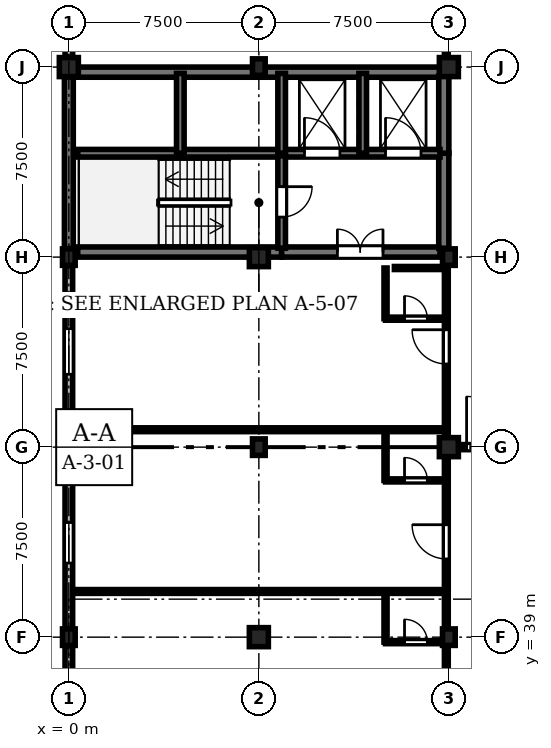
"""IFC4 building model, lengths in metres.
Left out: names, types, materials, properties, quantities, classifications, styles, units other than length and angle.
Written with IfcOpenShell. Run it as: python <this file> out.ifc"""

import sys

from ifc_helpers import new_model, si_unit, direction, frame, frame_2d, origin, origin_2d, place, context, subcontext, project, spatial, rectangle, extrude, element, fill, save


model = new_model("IFC4")
c1 = context("Model", 3, precision=1e-05, world=origin(), true_north=direction((0.0, 1.0)))
c2 = subcontext(c1, "Body", "Model", "MODEL_VIEW")
j1 = project(units=[si_unit("LENGTHUNIT", "METRE"), si_unit("PLANEANGLEUNIT", "RADIAN")], contexts=[c1])
p1 = place(None, origin())
s1 = spatial("IfcSite", under=j1, at=p1, CompositionType="ELEMENT")
p2 = place(p1, origin())
s2 = spatial("IfcBuilding", under=s1, at=p2, CompositionType="ELEMENT")
p3 = place(p2, frame((0.0, 0.0, 14.1)))
s3 = spatial("IfcBuildingStorey", under=s2, at=p3, CompositionType="ELEMENT", Elevation=14.1)
p4 = place(p3, frame((0.0, 39.0, 0.0), z_axis=(0.0, 0.0, 1.0), x_axis=(1.0, 0.0, 0.0)))
e1 = element("IfcColumn", 1, at=p4, inside=s3, PredefinedType="COLUMN", context=c2, shape_type="SweptSolid", body=[
    extrude(rectangle(XDim=0.5, YDim=0.65, at=origin_2d()), origin(), (0.0, 0.0, 1.0), 3.75),
])
p5 = place(p3, frame((0.0, 46.5, 0.0), z_axis=(0.0, 0.0, 1.0), x_axis=(1.0, 0.0, 0.0)))
e2 = element("IfcColumn", 2, at=p5, inside=s3, PredefinedType="COLUMN", context=c2, shape_type="SweptSolid", body=[
    extrude(rectangle(XDim=0.75, YDim=0.75, at=origin_2d()), origin(), (0.0, 0.0, 1.0), 3.75),
])
p6 = place(p3, frame((0.0, 54.0, 0.0), z_axis=(0.0, 0.0, 1.0), x_axis=(1.0, 0.0, 0.0)))
e3 = element("IfcColumn", 3, at=p6, inside=s3, PredefinedType="COLUMN", context=c2, shape_type="SweptSolid", body=[
    extrude(rectangle(XDim=0.5, YDim=0.65, at=origin_2d()), origin(), (0.0, 0.0, 1.0), 3.75),
])
for number, where, z_axis, x_axis in (
    (4, (0.0, 61.5, 0.0), (0.0, 0.0, 1.0), (1.0, 0.0, 0.0)),
    (5, (7.5, 39.0, 0.0), (0.0, 0.0, 1.0), (1.0, 0.0, 0.0)),
):
    element("IfcColumn", number, at=place(p3, frame(where, z_axis=z_axis, x_axis=x_axis)), inside=s3, PredefinedType="COLUMN", context=c2, shape_type="SweptSolid", body=[
        extrude(rectangle(XDim=0.75, YDim=0.75, at=origin_2d()), origin(), (0.0, 0.0, 1.0), 3.75),
    ])
p7 = place(p3, frame((7.5, 46.5, 0.0), z_axis=(0.0, 0.0, 1.0), x_axis=(1.0, 0.0, 0.0)))
e6 = element("IfcColumn", 6, at=p7, inside=s3, PredefinedType="COLUMN", context=c2, shape_type="SweptSolid", body=[
    extrude(rectangle(XDim=0.5, YDim=0.65, at=origin_2d()), origin(), (0.0, 0.0, 1.0), 3.75),
])
p8 = place(p3, frame((7.5, 54.0, 0.0), z_axis=(0.0, 0.0, 1.0), x_axis=(1.0, 0.0, 0.0)))
e7 = element("IfcColumn", 7, at=p8, inside=s3, PredefinedType="COLUMN", context=c2, shape_type="SweptSolid", body=[
    extrude(rectangle(XDim=0.75, YDim=0.75, at=origin_2d()), origin(), (0.0, 0.0, 1.0), 3.75),
])
for number, where, z_axis, x_axis in (
    (8, (7.5, 61.5, 0.0), (0.0, 0.0, 1.0), (1.0, 0.0, 0.0)),
    (9, (15.0, 39.0, 0.0), (0.0, 0.0, 1.0), (1.0, 0.0, 0.0)),
):
    element("IfcColumn", number, at=place(p3, frame(where, z_axis=z_axis, x_axis=x_axis)), inside=s3, PredefinedType="COLUMN", context=c2, shape_type="SweptSolid", body=[
        extrude(rectangle(XDim=0.5, YDim=0.65, at=origin_2d()), origin(), (0.0, 0.0, 1.0), 3.75),
    ])
p9 = place(p3, frame((15.0, 46.5, 0.0), z_axis=(0.0, 0.0, 1.0), x_axis=(1.0, 0.0, 0.0)))
e10 = element("IfcColumn", 10, at=p9, inside=s3, PredefinedType="COLUMN", context=c2, shape_type="SweptSolid", body=[
    extrude(rectangle(XDim=0.75, YDim=0.75, at=origin_2d()), origin(), (0.0, 0.0, 1.0), 3.75),
])
p10 = place(p3, frame((15.0, 54.0, 0.0), z_axis=(0.0, 0.0, 1.0), x_axis=(1.0, 0.0, 0.0)))
e11 = element("IfcColumn", 11, at=p10, inside=s3, PredefinedType="COLUMN", context=c2, shape_type="SweptSolid", body=[
    extrude(rectangle(XDim=0.5, YDim=0.65, at=origin_2d()), origin(), (0.0, 0.0, 1.0), 3.75),
])
p11 = place(p3, frame((15.0, 61.5, 0.0), z_axis=(0.0, 0.0, 1.0), x_axis=(1.0, 0.0, 0.0)))
e12 = element("IfcColumn", 12, at=p11, inside=s3, PredefinedType="COLUMN", context=c2, shape_type="SweptSolid", body=[
    extrude(rectangle(XDim=0.75, YDim=0.75, at=origin_2d()), origin(), (0.0, 0.0, 1.0), 3.75),
])
p12 = place(p3, frame((0.0, 31.885, 0.0), z_axis=(0.0, 0.0, 1.0), x_axis=(0.0, 1.0, 0.0)))
e13 = element("IfcWall", 13, at=p12, inside=s3, PredefinedType="STANDARD", context=c2, shape_type="SweptSolid", body=[
    extrude(rectangle(XDim=6.78, YDim=0.3, at=frame_2d((3.39, 0.0))), origin(), (0.0, 0.0, 1.0), 2.87),
])
p13 = place(p12, frame((2.69, 0.0, 0.9)))
e14 = element("IfcOpeningElement", 14, at=p13, cuts=e13, PredefinedType="OPENING", context=c2, shape_type="SweptSolid", body=[
    extrude(rectangle(XDim=1.4, YDim=1.69, at=frame_2d((0.7, 0.845))), frame((0.0, 0.16, 0.0), z_axis=(0.0, -1.0, 0.0), x_axis=(1.0, 0.0, 0.0)), (0.0, 0.0, 1.0), 0.32),
])
p14 = place(p3, frame((0.0, 39.335, 0.0), z_axis=(0.0, 0.0, 1.0), x_axis=(0.0, 1.0, 0.0)))
e15 = element("IfcWall", 15, at=p14, inside=s3, PredefinedType="STANDARD", context=c2, shape_type="SweptSolid", body=[
    extrude(rectangle(XDim=6.78, YDim=0.3, at=frame_2d((3.39, 0.0))), origin(), (0.0, 0.0, 1.0), 2.87),
])
p15 = place(p14, frame((2.59, 0.0, 0.9)))
e16 = element("IfcOpeningElement", 16, at=p15, cuts=e15, PredefinedType="OPENING", context=c2, shape_type="SweptSolid", body=[
    extrude(rectangle(XDim=1.6, YDim=1.69, at=frame_2d((0.8, 0.845))), frame((0.0, 0.16, 0.0), z_axis=(0.0, -1.0, 0.0), x_axis=(1.0, 0.0, 0.0)), (0.0, 0.0, 1.0), 0.32),
])
p16 = place(p3, frame((0.0, 46.885, 0.0), z_axis=(0.0, 0.0, 1.0), x_axis=(0.0, 1.0, 0.0)))
e17 = element("IfcWall", 17, at=p16, inside=s3, PredefinedType="STANDARD", context=c2, shape_type="SweptSolid", body=[
    extrude(rectangle(XDim=6.78, YDim=0.3, at=frame_2d((3.39, 0.0))), origin(), (0.0, 0.0, 1.0), 2.87),
])
p17 = place(p16, frame((2.49, 0.0, 0.9)))
e18 = element("IfcOpeningElement", 18, at=p17, cuts=e17, PredefinedType="OPENING", context=c2, shape_type="SweptSolid", body=[
    extrude(rectangle(XDim=1.8, YDim=1.69, at=frame_2d((0.9, 0.845))), frame((0.0, 0.16, 0.0), z_axis=(0.0, -1.0, 0.0), x_axis=(1.0, 0.0, 0.0)), (0.0, 0.0, 1.0), 0.32),
])
p18 = place(p3, frame((0.0, 54.335, 0.0), z_axis=(0.0, 0.0, 1.0), x_axis=(0.0, 1.0, 0.0)))
e19 = element("IfcWall", 19, at=p18, inside=s3, PredefinedType="SHEAR", context=c2, shape_type="SweptSolid", body=[
    extrude(rectangle(XDim=6.78, YDim=0.35, at=frame_2d((3.39, 0.0))), origin(), (0.0, 0.0, 1.0), 3.47),
])
p19 = place(p3, frame((0.0, 61.885, 0.0), z_axis=(0.0, 0.0, 1.0), x_axis=(0.0, 1.0, 0.0)))
e20 = element("IfcWall", 20, at=p19, inside=s3, PredefinedType="STANDARD", context=c2, shape_type="SweptSolid", body=[
    extrude(rectangle(XDim=6.78, YDim=0.3, at=frame_2d((3.39, 0.0))), origin(), (0.0, 0.0, 1.0), 2.87),
])
p20 = place(p19, frame((2.64, 0.0, 0.9)))
e21 = element("IfcOpeningElement", 21, at=p20, cuts=e20, PredefinedType="OPENING", context=c2, shape_type="SweptSolid", body=[
    extrude(rectangle(XDim=1.5, YDim=1.69, at=frame_2d((0.75, 0.845))), frame((0.0, 0.16, 0.0), z_axis=(0.0, -1.0, 0.0), x_axis=(1.0, 0.0, 0.0)), (0.0, 0.0, 1.0), 0.32),
])
p21 = place(p3, frame((0.35, 54.2, 0.0), z_axis=(0.0, 0.0, 1.0), x_axis=(1.0, 0.0, 0.0)))
e22 = element("IfcWall", 22, at=p21, inside=s3, PredefinedType="SHEAR", context=c2, shape_type="SweptSolid", body=[
    extrude(rectangle(XDim=8.05, YDim=0.4, at=frame_2d((4.025, 0.0))), origin(), (0.0, 0.0, 1.0), 3.47),
])
p22 = place(p3, frame((8.4, 54.2, 0.0), z_axis=(0.0, 0.0, 1.0), x_axis=(1.0, 0.0, 0.0)))
e23 = element("IfcWall", 23, at=p22, inside=s3, PredefinedType="SHEAR", context=c2, shape_type="SweptSolid", body=[
    extrude(rectangle(XDim=6.25, YDim=0.4, at=frame_2d((3.125, 0.0))), origin(), (0.0, 0.0, 1.0), 3.47),
])
p23 = place(p22, frame((2.2, 0.0, 0.0)))
e24 = element("IfcOpeningElement", 24, at=p23, cuts=e23, PredefinedType="OPENING", context=c2, shape_type="SweptSolid", body=[
    extrude(rectangle(XDim=1.8, YDim=2.25, at=frame_2d((0.9, 1.125))), frame((0.0, 0.21, 0.0), z_axis=(0.0, -1.0, 0.0), x_axis=(1.0, 0.0, 0.0)), (0.0, 0.0, 1.0), 0.42),
])
p24 = place(p3, frame((0.35, 61.3, 0.0), z_axis=(0.0, 0.0, 1.0), x_axis=(1.0, 0.0, 0.0)))
e25 = element("IfcWall", 25, at=p24, inside=s3, PredefinedType="SHEAR", context=c2, shape_type="SweptSolid", body=[
    extrude(rectangle(XDim=14.3, YDim=0.4, at=frame_2d((7.15, 0.0))), origin(), (0.0, 0.0, 1.0), 3.47),
])
p25 = place(p3, frame((14.8, 54.35, 0.0), z_axis=(0.0, 0.0, 1.0), x_axis=(0.0, 1.0, 0.0)))
e26 = element("IfcWall", 26, at=p25, inside=s3, PredefinedType="SHEAR", context=c2, shape_type="SweptSolid", body=[
    extrude(rectangle(XDim=3.75, YDim=0.4, at=frame_2d((1.875, 0.0))), origin(), (0.0, 0.0, 1.0), 3.47),
])
p26 = place(p3, frame((14.8, 58.1, 0.0), z_axis=(0.0, 0.0, 1.0), x_axis=(0.0, 1.0, 0.0)))
e27 = element("IfcWall", 27, at=p26, inside=s3, PredefinedType="SHEAR", context=c2, shape_type="SweptSolid", body=[
    extrude(rectangle(XDim=3.05, YDim=0.4, at=frame_2d((1.525, 0.0))), origin(), (0.0, 0.0, 1.0), 3.47),
])
p27 = place(p3, frame((0.35, 58.1, 0.0), z_axis=(0.0, 0.0, 1.0), x_axis=(1.0, 0.0, 0.0)))
e28 = element("IfcWall", 28, at=p27, inside=s3, PredefinedType="SHEAR", context=c2, shape_type="SweptSolid", body=[
    extrude(rectangle(XDim=8.05, YDim=0.3, at=frame_2d((4.025, 0.0))), origin(), (0.0, 0.0, 1.0), 3.47),
])
p28 = place(p3, frame((8.4, 58.1, 0.0), z_axis=(0.0, 0.0, 1.0), x_axis=(1.0, 0.0, 0.0)))
e29 = element("IfcWall", 29, at=p28, inside=s3, PredefinedType="SHEAR", context=c2, shape_type="SweptSolid", body=[
    extrude(rectangle(XDim=6.25, YDim=0.3, at=frame_2d((3.125, 0.0))), origin(), (0.0, 0.0, 1.0), 3.47),
])
p29 = place(p28, frame((0.9, 0.0, 0.0)))
e30 = element("IfcOpeningElement", 30, at=p29, cuts=e29, PredefinedType="OPENING", context=c2, shape_type="SweptSolid", body=[
    extrude(rectangle(XDim=1.4, YDim=2.25, at=frame_2d((0.7, 1.125))), frame((0.0, 0.16, 0.0), z_axis=(0.0, -1.0, 0.0), x_axis=(1.0, 0.0, 0.0)), (0.0, 0.0, 1.0), 0.32),
])
p30 = place(p28, frame((4.1, 0.0, 0.0)))
e31 = element("IfcOpeningElement", 31, at=p30, cuts=e29, PredefinedType="OPENING", context=c2, shape_type="SweptSolid", body=[
    extrude(rectangle(XDim=1.4, YDim=2.25, at=frame_2d((0.7, 1.125))), frame((0.0, 0.16, 0.0), z_axis=(0.0, -1.0, 0.0), x_axis=(1.0, 0.0, 0.0)), (0.0, 0.0, 1.0), 0.32),
])
p31 = place(p3, frame((8.4, 58.0, 0.0), z_axis=(0.0, 0.0, 1.0), x_axis=(0.0, -1.0, 0.0)))
e32 = element("IfcWall", 32, at=p31, inside=s3, PredefinedType="SHEAR", context=c2, shape_type="SweptSolid", body=[
    extrude(rectangle(XDim=3.65, YDim=0.3, at=frame_2d((1.825, 0.0))), origin(), (0.0, 0.0, 1.0), 3.47),
])
p32 = place(p31, frame((1.22, 0.0, 0.0)))
e33 = element("IfcOpeningElement", 33, at=p32, cuts=e32, PredefinedType="OPENING", context=c2, shape_type="SweptSolid", body=[
    extrude(rectangle(XDim=1.2, YDim=2.25, at=frame_2d((0.6, 1.125))), frame((0.0, 0.16, 0.0), z_axis=(0.0, -1.0, 0.0), x_axis=(1.0, 0.0, 0.0)), (0.0, 0.0, 1.0), 0.32),
])
for number, where, z_axis, x_axis in (
    (34, (4.4, 58.1, 0.0), (0.0, 0.0, 1.0), (0.0, 1.0, 0.0)),
    (35, (8.4, 58.1, 0.0), (0.0, 0.0, 1.0), (0.0, 1.0, 0.0)),
    (36, (11.6, 58.1, 0.0), (0.0, 0.0, 1.0), (0.0, 1.0, 0.0)),
):
    element("IfcWall", number, at=place(p3, frame(where, z_axis=z_axis, x_axis=x_axis)), inside=s3, PredefinedType="SHEAR", context=c2, shape_type="SweptSolid", body=[
        extrude(rectangle(XDim=3.15, YDim=0.3, at=frame_2d((1.575, 0.0))), origin(), (0.0, 0.0, 1.0), 3.47),
    ])
p33 = place(p3, frame((14.9, 34.58, 0.0), z_axis=(0.0, 0.0, 1.0), x_axis=(0.0, 1.0, 0.0)))
e37 = element("IfcWall", 37, at=p33, inside=s3, PredefinedType="PARTITIONING", context=c2, shape_type="SweptSolid", body=[
    extrude(rectangle(XDim=6.223, YDim=0.15, at=frame_2d((3.112, 0.0))), origin(), (0.0, 0.0, 1.0), 2.905),
])
p34 = place(p33, frame((0.25, 0.0, 0.0)))
e38 = element("IfcOpeningElement", 38, at=p34, cuts=e37, PredefinedType="OPENING", context=c2, shape_type="SweptSolid", body=[
    extrude(rectangle(XDim=1.35, YDim=2.25, at=frame_2d((0.675, 1.125))), frame((0.0, 0.085, 0.0), z_axis=(0.0, -1.0, 0.0), x_axis=(1.0, 0.0, 0.0)), (0.0, 0.0, 1.0), 0.17),
])
p35 = place(p3, frame((12.5, 38.803, 0.0), z_axis=(0.0, 0.0, 1.0), x_axis=(1.0, 0.0, 0.0)))
e39 = element("IfcWall", 39, at=p35, inside=s3, PredefinedType="PARTITIONING", context=c2, shape_type="SweptSolid", body=[
    extrude(rectangle(XDim=2.4, YDim=0.12, at=frame_2d((1.2, 0.0))), origin(), (0.0, 0.0, 1.0), 2.855),
])
p36 = place(p35, frame((0.75, 0.0, 0.0)))
e40 = element("IfcOpeningElement", 40, at=p36, cuts=e39, PredefinedType="OPENING", context=c2, shape_type="SweptSolid", body=[
    extrude(rectangle(XDim=0.9, YDim=2.1, at=frame_2d((0.45, 1.05))), frame((0.0, 0.07, 0.0), z_axis=(0.0, -1.0, 0.0), x_axis=(1.0, 0.0, 0.0)), (0.0, 0.0, 1.0), 0.14),
])
p37 = place(p3, frame((12.5, 38.803, 0.0), z_axis=(0.0, 0.0, 1.0), x_axis=(0.0, 1.0, 0.0)))
e41 = element("IfcWall", 41, at=p37, inside=s3, PredefinedType="PARTITIONING", context=c2, shape_type="SweptSolid", body=[
    extrude(rectangle(XDim=2.0, YDim=0.12, at=frame_2d((1.0, 0.0))), origin(), (0.0, 0.0, 1.0), 3.455),
])
p38 = place(p3, frame((14.9, 40.963, 0.0), z_axis=(0.0, 0.0, 1.0), x_axis=(0.0, 1.0, 0.0)))
e42 = element("IfcWall", 42, at=p38, inside=s3, PredefinedType="PARTITIONING", context=c2, shape_type="SweptSolid", body=[
    extrude(rectangle(XDim=6.223, YDim=0.15, at=frame_2d((3.112, 0.0))), origin(), (0.0, 0.0, 1.0), 2.905),
])
p39 = place(p38, frame((1.125, 0.0, 0.0)))
e43 = element("IfcOpeningElement", 43, at=p39, cuts=e42, PredefinedType="OPENING", context=c2, shape_type="SweptSolid", body=[
    extrude(rectangle(XDim=1.35, YDim=2.25, at=frame_2d((0.675, 1.125))), frame((0.0, 0.085, 0.0), z_axis=(0.0, -1.0, 0.0), x_axis=(1.0, 0.0, 0.0)), (0.0, 0.0, 1.0), 0.17),
])
p40 = place(p3, frame((12.5, 45.187, 0.0), z_axis=(0.0, 0.0, 1.0), x_axis=(1.0, 0.0, 0.0)))
e44 = element("IfcWall", 44, at=p40, inside=s3, PredefinedType="PARTITIONING", context=c2, shape_type="SweptSolid", body=[
    extrude(rectangle(XDim=2.4, YDim=0.12, at=frame_2d((1.2, 0.0))), origin(), (0.0, 0.0, 1.0), 3.455),
])
p41 = place(p40, frame((0.75, 0.0, 0.0)))
e45 = element("IfcOpeningElement", 45, at=p41, cuts=e44, PredefinedType="OPENING", context=c2, shape_type="SweptSolid", body=[
    extrude(rectangle(XDim=0.9, YDim=2.1, at=frame_2d((0.45, 1.05))), frame((0.0, 0.07, 0.0), z_axis=(0.0, -1.0, 0.0), x_axis=(1.0, 0.0, 0.0)), (0.0, 0.0, 1.0), 0.14),
])
p42 = place(p3, frame((12.5, 45.187, 0.0), z_axis=(0.0, 0.0, 1.0), x_axis=(0.0, 1.0, 0.0)))
e46 = element("IfcWall", 46, at=p42, inside=s3, PredefinedType="PARTITIONING", context=c2, shape_type="SweptSolid", body=[
    extrude(rectangle(XDim=2.0, YDim=0.12, at=frame_2d((1.0, 0.0))), origin(), (0.0, 0.0, 1.0), 3.455),
])
p43 = place(p3, frame((14.9, 47.347, 0.0), z_axis=(0.0, 0.0, 1.0), x_axis=(0.0, 1.0, 0.0)))
e47 = element("IfcWall", 47, at=p43, inside=s3, PredefinedType="PARTITIONING", context=c2, shape_type="SweptSolid", body=[
    extrude(rectangle(XDim=6.223, YDim=0.15, at=frame_2d((3.112, 0.0))), origin(), (0.0, 0.0, 1.0), 2.905),
])
p44 = place(p43, frame((2.437, 0.0, 0.0)))
e48 = element("IfcOpeningElement", 48, at=p44, cuts=e47, PredefinedType="OPENING", context=c2, shape_type="SweptSolid", body=[
    extrude(rectangle(XDim=1.35, YDim=2.25, at=frame_2d((0.675, 1.125))), frame((0.0, 0.085, 0.0), z_axis=(0.0, -1.0, 0.0), x_axis=(1.0, 0.0, 0.0)), (0.0, 0.0, 1.0), 0.17),
])
p45 = place(p3, frame((12.5, 51.57, 0.0), z_axis=(0.0, 0.0, 1.0), x_axis=(1.0, 0.0, 0.0)))
e49 = element("IfcWall", 49, at=p45, inside=s3, PredefinedType="PARTITIONING", context=c2, shape_type="SweptSolid", body=[
    extrude(rectangle(XDim=2.4, YDim=0.12, at=frame_2d((1.2, 0.0))), origin(), (0.0, 0.0, 1.0), 3.455),
])
p46 = place(p45, frame((0.75, 0.0, 0.0)))
e50 = element("IfcOpeningElement", 50, at=p46, cuts=e49, PredefinedType="OPENING", context=c2, shape_type="SweptSolid", body=[
    extrude(rectangle(XDim=0.9, YDim=2.1, at=frame_2d((0.45, 1.05))), frame((0.0, 0.07, 0.0), z_axis=(0.0, -1.0, 0.0), x_axis=(1.0, 0.0, 0.0)), (0.0, 0.0, 1.0), 0.14),
])
p47 = place(p3, frame((12.5, 51.57, 0.0), z_axis=(0.0, 0.0, 1.0), x_axis=(0.0, 1.0, 0.0)))
e51 = element("IfcWall", 51, at=p47, inside=s3, PredefinedType="PARTITIONING", context=c2, shape_type="SweptSolid", body=[
    extrude(rectangle(XDim=2.0, YDim=0.12, at=frame_2d((1.0, 0.0))), origin(), (0.0, 0.0, 1.0), 3.455),
])
p48 = place(p3, frame((14.9, 61.93, 0.0), z_axis=(0.0, 0.0, 1.0), x_axis=(0.0, 1.0, 0.0)))
e52 = element("IfcWall", 52, at=p48, inside=s3, PredefinedType="PARTITIONING", context=c2, shape_type="SweptSolid", body=[
    extrude(rectangle(XDim=7.54, YDim=0.15, at=frame_2d((3.77, 0.0))), origin(), (0.0, 0.0, 1.0), 2.905),
])
p49 = place(p48, frame((2.526, 0.0, 0.0)))
e53 = element("IfcOpeningElement", 53, at=p49, cuts=e52, PredefinedType="OPENING", context=c2, shape_type="SweptSolid", body=[
    extrude(rectangle(XDim=1.35, YDim=2.25, at=frame_2d((0.675, 1.125))), frame((0.0, 0.085, 0.0), z_axis=(0.0, -1.0, 0.0), x_axis=(1.0, 0.0, 0.0)), (0.0, 0.0, 1.0), 0.17),
])
for number, where, z_axis, x_axis in (
    (54, (0.35, 40.803, 0.0), (0.0, 0.0, 1.0), (1.0, 0.0, 0.0)),
    (55, (0.35, 47.187, 0.0), (0.0, 0.0, 1.0), (1.0, 0.0, 0.0)),
):
    element("IfcWall", number, at=place(p3, frame(where, z_axis=z_axis, x_axis=x_axis)), inside=s3, PredefinedType="PARTITIONING", context=c2, shape_type="SweptSolid", body=[
        extrude(rectangle(XDim=14.55, YDim=0.15, at=frame_2d((7.275, 0.0))), origin(), (0.0, 0.0, 1.0), 3.455),
    ])
p50 = place(p3, frame((12.85, 53.57, 0.0), z_axis=(0.0, 0.0, 1.0), x_axis=(1.0, 0.0, 0.0)))
e56 = element("IfcWall", 56, at=p50, inside=s3, PredefinedType="PARTITIONING", context=c2, shape_type="SweptSolid", body=[
    extrude(rectangle(XDim=2.05, YDim=0.12, at=frame_2d((1.025, 0.0))), origin(), (0.0, 0.0, 1.0), 3.455),
])
p51 = place(p3, frame((15.2, 46.5, 0.0), z_axis=(0.0, 0.0, 1.0), x_axis=(1.0, 0.0, 0.0)))
e57 = element("IfcWall", 57, at=p51, inside=s3, PredefinedType="STANDARD", context=c2, shape_type="SweptSolid", body=[
    extrude(rectangle(XDim=3.0, YDim=0.2, at=frame_2d((1.5, 0.0))), origin(), (0.0, 0.0, 1.0), 2.855),
])
p52 = place(p51, frame((0.5, 0.0, 0.0)))
e58 = element("IfcOpeningElement", 58, at=p52, cuts=e57, PredefinedType="OPENING", context=c2, shape_type="SweptSolid", body=[
    extrude(rectangle(XDim=2.0, YDim=2.3, at=frame_2d((1.0, 1.15))), frame((0.0, 0.11, 0.0), z_axis=(0.0, -1.0, 0.0), x_axis=(1.0, 0.0, 0.0)), (0.0, 0.0, 1.0), 0.22),
])
p53 = place(p15, origin())
e59 = element("IfcWindow", 59, at=p53, inside=s3, PartitioningType="SINGLE_PANEL", PredefinedType="WINDOW", context=c2, shape_type="SweptSolid", body=[
    extrude(rectangle(XDim=1.6, YDim=1.69, at=frame_2d((0.8, 0.845))), frame((0.0, 0.03, 0.0), z_axis=(0.0, -1.0, 0.0), x_axis=(1.0, 0.0, 0.0)), (0.0, 0.0, 1.0), 0.06),
])
fill(e16, e59)
p54 = place(p17, origin())
e60 = element("IfcWindow", 60, at=p54, inside=s3, PartitioningType="SINGLE_PANEL", PredefinedType="WINDOW", context=c2, shape_type="SweptSolid", body=[
    extrude(rectangle(XDim=1.8, YDim=1.69, at=frame_2d((0.9, 0.845))), frame((0.0, 0.03, 0.0), z_axis=(0.0, -1.0, 0.0), x_axis=(1.0, 0.0, 0.0)), (0.0, 0.0, 1.0), 0.06),
])
fill(e18, e60)
p55 = place(p23, origin())
e61 = element("IfcDoor", 61, at=p55, inside=s3, OperationType="DOUBLE_DOOR_SINGLE_SWING", PredefinedType="DOOR", context=c2, shape_type="SweptSolid", body=[
    extrude(rectangle(XDim=1.8, YDim=2.25, at=frame_2d((0.9, 1.125))), frame((0.0, 0.025, 0.0), z_axis=(0.0, -1.0, 0.0), x_axis=(1.0, 0.0, 0.0)), (0.0, 0.0, 1.0), 0.05),
])
fill(e24, e61)
p56 = place(p29, origin())
e62 = element("IfcDoor", 62, at=p56, inside=s3, OperationType="DOUBLE_DOOR_SLIDING", PredefinedType="DOOR", context=c2, shape_type="SweptSolid", body=[
    extrude(rectangle(XDim=1.4, YDim=2.25, at=frame_2d((0.7, 1.125))), frame((0.0, 0.025, 0.0), z_axis=(0.0, -1.0, 0.0), x_axis=(1.0, 0.0, 0.0)), (0.0, 0.0, 1.0), 0.05),
])
fill(e30, e62)
p57 = place(p30, origin())
e63 = element("IfcDoor", 63, at=p57, inside=s3, OperationType="DOUBLE_DOOR_SLIDING", PredefinedType="DOOR", context=c2, shape_type="SweptSolid", body=[
    extrude(rectangle(XDim=1.4, YDim=2.25, at=frame_2d((0.7, 1.125))), frame((0.0, 0.025, 0.0), z_axis=(0.0, -1.0, 0.0), x_axis=(1.0, 0.0, 0.0)), (0.0, 0.0, 1.0), 0.05),
])
fill(e31, e63)
p58 = place(p32, origin())
e64 = element("IfcDoor", 64, at=p58, inside=s3, OperationType="SINGLE_SWING_LEFT", PredefinedType="DOOR", context=c2, shape_type="SweptSolid", body=[
    extrude(rectangle(XDim=1.2, YDim=2.25, at=frame_2d((0.6, 1.125))), frame((0.0, 0.025, 0.0), z_axis=(0.0, -1.0, 0.0), x_axis=(1.0, 0.0, 0.0)), (0.0, 0.0, 1.0), 0.05),
])
fill(e33, e64)
p59 = place(p36, origin())
e65 = element("IfcDoor", 65, at=p59, inside=s3, OperationType="SINGLE_SWING_LEFT", PredefinedType="DOOR", context=c2, shape_type="SweptSolid", body=[
    extrude(rectangle(XDim=0.9, YDim=2.1, at=frame_2d((0.45, 1.05))), frame((0.0, 0.025, 0.0), z_axis=(0.0, -1.0, 0.0), x_axis=(1.0, 0.0, 0.0)), (0.0, 0.0, 1.0), 0.05),
])
fill(e40, e65)
p60 = place(p39, origin())
e66 = element("IfcDoor", 66, at=p60, inside=s3, OperationType="SINGLE_SWING_RIGHT", PredefinedType="DOOR", context=c2, shape_type="SweptSolid", body=[
    extrude(rectangle(XDim=1.35, YDim=2.25, at=frame_2d((0.675, 1.125))), frame((0.0, 0.025, 0.0), z_axis=(0.0, -1.0, 0.0), x_axis=(1.0, 0.0, 0.0)), (0.0, 0.0, 1.0), 0.05),
])
fill(e43, e66)
p61 = place(p41, origin())
e67 = element("IfcDoor", 67, at=p61, inside=s3, OperationType="SINGLE_SWING_LEFT", PredefinedType="DOOR", context=c2, shape_type="SweptSolid", body=[
    extrude(rectangle(XDim=0.9, YDim=2.1, at=frame_2d((0.45, 1.05))), frame((0.0, 0.025, 0.0), z_axis=(0.0, -1.0, 0.0), x_axis=(1.0, 0.0, 0.0)), (0.0, 0.0, 1.0), 0.05),
])
fill(e45, e67)
p62 = place(p44, origin())
e68 = element("IfcDoor", 68, at=p62, inside=s3, OperationType="SINGLE_SWING_RIGHT", PredefinedType="DOOR", context=c2, shape_type="SweptSolid", body=[
    extrude(rectangle(XDim=1.35, YDim=2.25, at=frame_2d((0.675, 1.125))), frame((0.0, 0.025, 0.0), z_axis=(0.0, -1.0, 0.0), x_axis=(1.0, 0.0, 0.0)), (0.0, 0.0, 1.0), 0.05),
])
fill(e48, e68)
p63 = place(p46, origin())
e69 = element("IfcDoor", 69, at=p63, inside=s3, OperationType="SINGLE_SWING_LEFT", PredefinedType="DOOR", context=c2, shape_type="SweptSolid", body=[
    extrude(rectangle(XDim=0.9, YDim=2.1, at=frame_2d((0.45, 1.05))), frame((0.0, 0.025, 0.0), z_axis=(0.0, -1.0, 0.0), x_axis=(1.0, 0.0, 0.0)), (0.0, 0.0, 1.0), 0.05),
])
fill(e50, e69)
p64 = place(p52, origin())
e70 = element("IfcDoor", 70, at=p64, inside=s3, OperationType="DOUBLE_DOOR_SINGLE_SWING", PredefinedType="DOOR", context=c2, shape_type="SweptSolid", body=[
    extrude(rectangle(XDim=2.0, YDim=2.3, at=frame_2d((1.0, 1.15))), frame((0.0, 0.025, 0.0), z_axis=(0.0, -1.0, 0.0), x_axis=(1.0, 0.0, 0.0)), (0.0, 0.0, 1.0), 0.05),
])
fill(e58, e70)
save(model, sys.argv[1])
